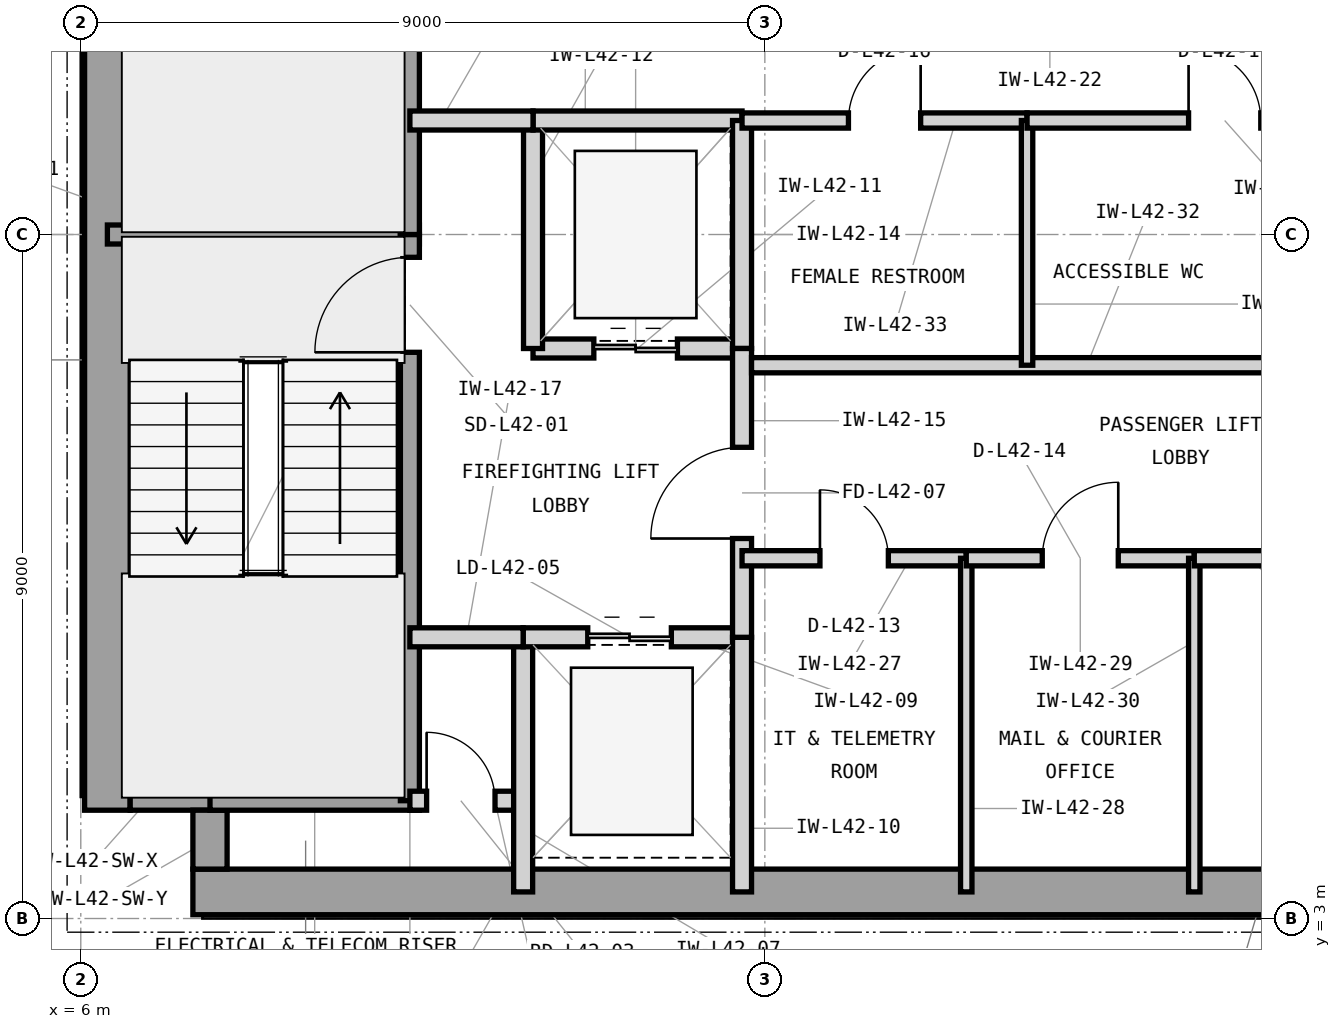
"""IFC4 building model, lengths in metres.
Left out: names, types, materials, properties, quantities, classifications, styles, units other than length and angle.
Written with IfcOpenShell. Run it as: python <this file> out.ifc"""

import sys

from ifc_helpers import new_model, si_unit, direction, frame, frame_2d, origin, place, context, subcontext, project, spatial, rectangle, extrude, element, fill, save


model = new_model("IFC4")
c1 = context("Model", 3, precision=1e-05, world=origin(), true_north=direction((0.0, 1.0)))
c2 = subcontext(c1, "Body", "Model", "MODEL_VIEW")
j1 = project(units=[si_unit("LENGTHUNIT", "METRE"), si_unit("PLANEANGLEUNIT", "RADIAN")], contexts=[c1])
p1 = place(None, origin())
s1 = spatial("IfcSite", under=j1, at=p1, CompositionType="ELEMENT")
p2 = place(p1, origin())
s2 = spatial("IfcBuilding", under=s1, at=p2, CompositionType="ELEMENT")
p3 = place(p2, frame((0.0, 0.0, 176.1)))
s3 = spatial("IfcBuildingStorey", under=s2, at=p3, CompositionType="ELEMENT", Elevation=176.1)
p4 = place(p3, frame((7.475, 3.35, 0.0), z_axis=(0.0, 0.0, 1.0), x_axis=(1.0, 0.0, 0.0)))
e1 = element("IfcWall", 1, at=p4, inside=s3, PredefinedType="SHEAR", context=c2, shape_type="SweptSolid", body=[
    extrude(rectangle(XDim=16.475, YDim=0.6, at=frame_2d((8.237, 0.0))), origin(), (0.0, 0.0, 1.0), 3.9),
])
p5 = place(p3, frame((6.35, 4.425, 0.0), z_axis=(0.0, 0.0, 1.0), x_axis=(0.0, 1.0, 0.0)))
e2 = element("IfcWall", 2, at=p5, inside=s3, PredefinedType="SHEAR", context=c2, shape_type="SweptSolid", body=[
    extrude(rectangle(XDim=15.15, YDim=0.6, at=frame_2d((7.575, 0.0))), origin(), (0.0, 0.0, 1.0), 3.9),
])
p6 = place(p3, frame((6.65, 4.65, 0.0), z_axis=(0.0, 0.0, 1.0), x_axis=(1.0, 0.0, 0.0)))
e3 = element("IfcWall", 3, at=p6, inside=s3, PredefinedType="SHEAR", context=c2, shape_type="SweptSolid", body=[
    extrude(rectangle(XDim=1.275, YDim=0.45, at=frame_2d((0.638, 0.0))), origin(), (0.0, 0.0, 1.0), 3.9),
])
p7 = place(p3, frame((7.7, 3.65, 0.0), z_axis=(0.0, 0.0, 1.0), x_axis=(0.0, 1.0, 0.0)))
e4 = element("IfcWall", 4, at=p7, inside=s3, PredefinedType="SHEAR", context=c2, shape_type="SweptSolid", body=[
    extrude(rectangle(XDim=0.775, YDim=0.45, at=frame_2d((0.388, 0.0))), origin(), (0.0, 0.0, 1.0), 3.9),
])
p8 = place(p3, frame((6.35, 12.0, 0.0), z_axis=(0.0, 0.0, 1.0), x_axis=(1.0, 0.0, 0.0)))
e5 = element("IfcWall", 5, at=p8, inside=s3, PredefinedType="SHEAR", context=c2, shape_type="SweptSolid", body=[
    extrude(rectangle(XDim=4.105, YDim=0.25, at=frame_2d((2.052, 0.0))), origin(), (0.0, 0.0, 1.0), 3.9),
])
p9 = place(p3, frame((7.7, 4.55, 0.0), z_axis=(0.0, 0.0, 1.0), x_axis=(1.0, 0.0, 0.0)))
e6 = element("IfcWall", 6, at=p9, inside=s3, PredefinedType="SHEAR", context=c2, shape_type="SweptSolid", body=[
    extrude(rectangle(XDim=2.755, YDim=0.25, at=frame_2d((1.377, 0.0))), origin(), (0.0, 0.0, 1.0), 3.9),
])
p10 = place(p3, frame((10.33, 4.55, 0.0), z_axis=(0.0, 0.0, 1.0), x_axis=(0.0, 1.0, 0.0)))
e7 = element("IfcWall", 7, at=p10, inside=s3, PredefinedType="SHEAR", context=c2, shape_type="SweptSolid", body=[
    extrude(rectangle(XDim=7.45, YDim=0.25, at=frame_2d((3.725, 0.0))), origin(), (0.0, 0.0, 1.0), 3.9),
])
p11 = place(p10, frame((5.9, 0.0, 0.0)))
e8 = element("IfcOpeningElement", 8, at=p11, cuts=e7, PredefinedType="OPENING", context=c2, shape_type="SweptSolid", body=[
    extrude(rectangle(XDim=1.25, YDim=2.2, at=frame_2d((0.625, 1.1))), frame((0.0, 0.135, 0.0), z_axis=(0.0, -1.0, 0.0), x_axis=(1.0, 0.0, 0.0)), (0.0, 0.0, 1.0), 0.27),
])
p12 = place(p3, frame((10.33, 12.0, 0.0), z_axis=(0.0, 0.0, 1.0), x_axis=(0.0, 1.0, 0.0)))
e9 = element("IfcWall", 9, at=p12, inside=s3, PredefinedType="SHEAR", context=c2, shape_type="SweptSolid", body=[
    extrude(rectangle(XDim=7.45, YDim=0.25, at=frame_2d((3.725, 0.0))), origin(), (0.0, 0.0, 1.0), 3.9),
])
p13 = place(p12, frame((5.85, 0.0, 0.0)))
e10 = element("IfcOpeningElement", 10, at=p13, cuts=e9, PredefinedType="OPENING", context=c2, shape_type="SweptSolid", body=[
    extrude(rectangle(XDim=1.25, YDim=2.2, at=frame_2d((0.625, 1.1))), frame((0.0, 0.135, 0.0), z_axis=(0.0, -1.0, 0.0), x_axis=(1.0, 0.0, 0.0)), (0.0, 0.0, 1.0), 0.27),
])
p14 = place(p3, frame((10.33, 4.55, 0.0), z_axis=(0.0, 0.0, 1.0), x_axis=(1.0, 0.0, 0.0)))
e11 = element("IfcWall", 11, at=p14, inside=s3, PredefinedType="PARTITIONING", context=c2, shape_type="SweptSolid", body=[
    extrude(rectangle(XDim=1.49, YDim=0.25, at=frame_2d((0.745, 0.0))), origin(), (0.0, 0.0, 1.0), 3.69),
])
p15 = place(p14, frame((0.22, 0.0, 0.0)))
e12 = element("IfcOpeningElement", 12, at=p15, cuts=e11, PredefinedType="OPENING", context=c2, shape_type="SweptSolid", body=[
    extrude(rectangle(XDim=0.9, YDim=2.1, at=frame_2d((0.45, 1.05))), frame((0.0, 0.135, 0.0), z_axis=(0.0, -1.0, 0.0), x_axis=(1.0, 0.0, 0.0)), (0.0, 0.0, 1.0), 0.27),
])
p16 = place(p3, frame((11.82, 3.35, 0.0), z_axis=(0.0, 0.0, 1.0), x_axis=(0.0, 1.0, 0.0)))
e13 = element("IfcWall", 13, at=p16, inside=s3, PredefinedType="PARTITIONING", context=c2, shape_type="SweptSolid", body=[
    extrude(rectangle(XDim=3.35, YDim=0.25, at=frame_2d((1.675, 0.0))), origin(), (0.0, 0.0, 1.0), 3.69),
])
p17 = place(p3, frame((11.82, 6.7, 0.0), z_axis=(0.0, 0.0, 1.0), x_axis=(1.0, 0.0, 0.0)))
e14 = element("IfcWall", 14, at=p17, inside=s3, PredefinedType="PARTITIONING", context=c2, shape_type="SweptSolid", body=[
    extrude(rectangle(XDim=2.88, YDim=0.25, at=frame_2d((1.44, 0.0))), origin(), (0.0, 0.0, 1.0), 3.283),
])
p18 = place(p17, frame((0.85, 0.0, 0.0)))
e15 = element("IfcOpeningElement", 15, at=p18, cuts=e14, PredefinedType="OPENING", context=c2, shape_type="SweptSolid", body=[
    extrude(rectangle(XDim=1.1, YDim=2.25, at=frame_2d((0.55, 1.125))), frame((0.0, 0.135, 0.0), z_axis=(0.0, -1.0, 0.0), x_axis=(1.0, 0.0, 0.0)), (0.0, 0.0, 1.0), 0.27),
])
p19 = place(p3, frame((14.7, 3.35, 0.0), z_axis=(0.0, 0.0, 1.0), x_axis=(0.0, 1.0, 0.0)))
e16 = element("IfcWall", 16, at=p19, inside=s3, PredefinedType="PARTITIONING", context=c2, shape_type="SweptSolid", body=[
    extrude(rectangle(XDim=3.35, YDim=0.25, at=frame_2d((1.675, 0.0))), origin(), (0.0, 0.0, 1.0), 3.69),
])
p20 = place(p3, frame((11.95, 10.5, 0.0), z_axis=(0.0, 0.0, 1.0), x_axis=(1.0, 0.0, 0.0)))
e17 = element("IfcWall", 17, at=p20, inside=s3, PredefinedType="PARTITIONING", context=c2, shape_type="SweptSolid", body=[
    extrude(rectangle(XDim=2.75, YDim=0.25, at=frame_2d((1.375, 0.0))), origin(), (0.0, 0.0, 1.0), 3.283),
])
p21 = place(p20, frame((0.8, 0.0, 0.0)))
e18 = element("IfcOpeningElement", 18, at=p21, cuts=e17, PredefinedType="OPENING", context=c2, shape_type="SweptSolid", body=[
    extrude(rectangle(XDim=1.1, YDim=2.25, at=frame_2d((0.55, 1.125))), frame((0.0, 0.135, 0.0), z_axis=(0.0, -1.0, 0.0), x_axis=(1.0, 0.0, 0.0)), (0.0, 0.0, 1.0), 0.27),
])
p22 = place(p3, frame((11.95, 10.5, 0.0), z_axis=(0.0, 0.0, 1.0), x_axis=(0.0, 1.0, 0.0)))
e19 = element("IfcWall", 19, at=p22, inside=s3, PredefinedType="PARTITIONING", context=c2, shape_type="SweptSolid", body=[
    extrude(rectangle(XDim=3.0, YDim=0.25, at=frame_2d((1.5, 0.0))), origin(), (0.0, 0.0, 1.0), 3.69),
])
p23 = place(p3, frame((11.95, 13.5, 0.0), z_axis=(0.0, 0.0, 1.0), x_axis=(1.0, 0.0, 0.0)))
e20 = element("IfcWall", 20, at=p23, inside=s3, PredefinedType="PARTITIONING", context=c2, shape_type="SweptSolid", body=[
    extrude(rectangle(XDim=2.75, YDim=0.25, at=frame_2d((1.375, 0.0))), origin(), (0.0, 0.0, 1.0), 3.283),
])
p24 = place(p3, frame((14.7, 10.5, 0.0), z_axis=(0.0, 0.0, 1.0), x_axis=(0.0, 1.0, 0.0)))
e21 = element("IfcWall", 21, at=p24, inside=s3, PredefinedType="PARTITIONING", context=c2, shape_type="SweptSolid", body=[
    extrude(rectangle(XDim=3.0, YDim=0.25, at=frame_2d((1.5, 0.0))), origin(), (0.0, 0.0, 1.0), 3.69),
])
p25 = place(p3, frame((14.7, 6.7, 0.0), z_axis=(0.0, 0.0, 1.0), x_axis=(0.0, 1.0, 0.0)))
e22 = element("IfcWall", 22, at=p25, inside=s3, PredefinedType="PARTITIONING", context=c2, shape_type="SweptSolid", body=[
    extrude(rectangle(XDim=3.8, YDim=0.25, at=frame_2d((1.9, 0.0))), origin(), (0.0, 0.0, 1.0), 3.69),
])
p26 = place(p25, frame((1.3, 0.0, 0.0)))
e23 = element("IfcOpeningElement", 23, at=p26, cuts=e22, PredefinedType="OPENING", context=c2, shape_type="SweptSolid", body=[
    extrude(rectangle(XDim=1.2, YDim=2.2, at=frame_2d((0.6, 1.1))), frame((0.0, 0.135, 0.0), z_axis=(0.0, -1.0, 0.0), x_axis=(1.0, 0.0, 0.0)), (0.0, 0.0, 1.0), 0.27),
])
p27 = place(p3, frame((10.33, 13.5, 0.0), z_axis=(0.0, 0.0, 1.0), x_axis=(1.0, 0.0, 0.0)))
e24 = element("IfcWall", 24, at=p27, inside=s3, PredefinedType="PARTITIONING", context=c2, shape_type="SweptSolid", body=[
    extrude(rectangle(XDim=1.62, YDim=0.25, at=frame_2d((0.81, 0.0))), origin(), (0.0, 0.0, 1.0), 3.283),
])
p28 = place(p3, frame((10.33, 6.7, 0.0), z_axis=(0.0, 0.0, 1.0), x_axis=(1.0, 0.0, 0.0)))
e25 = element("IfcWall", 25, at=p28, inside=s3, PredefinedType="PARTITIONING", context=c2, shape_type="SweptSolid", body=[
    extrude(rectangle(XDim=1.49, YDim=0.25, at=frame_2d((0.745, 0.0))), origin(), (0.0, 0.0, 1.0), 3.283),
])
p29 = place(p3, frame((14.7, 7.74, 0.0), z_axis=(0.0, 0.0, 1.0), x_axis=(1.0, 0.0, 0.0)))
e26 = element("IfcWall", 26, at=p29, inside=s3, PredefinedType="PARTITIONING", context=c2, shape_type="SweptSolid", body=[
    extrude(rectangle(XDim=2.95, YDim=0.2, at=frame_2d((1.475, 0.0))), origin(), (0.0, 0.0, 1.0), 3.69),
])
p30 = place(p29, frame((1.025, 0.0, 0.0)))
e27 = element("IfcOpeningElement", 27, at=p30, cuts=e26, PredefinedType="OPENING", context=c2, shape_type="SweptSolid", body=[
    extrude(rectangle(XDim=0.9, YDim=2.1, at=frame_2d((0.45, 1.05))), frame((0.0, 0.11, 0.0), z_axis=(0.0, -1.0, 0.0), x_axis=(1.0, 0.0, 0.0)), (0.0, 0.0, 1.0), 0.22),
])
p31 = place(p3, frame((17.65, 3.35, 0.0), z_axis=(0.0, 0.0, 1.0), x_axis=(0.0, 1.0, 0.0)))
e28 = element("IfcWall", 28, at=p31, inside=s3, PredefinedType="PARTITIONING", context=c2, shape_type="SweptSolid", body=[
    extrude(rectangle(XDim=4.39, YDim=0.15, at=frame_2d((2.195, 0.0))), origin(), (0.0, 0.0, 1.0), 3.69),
])
p32 = place(p3, frame((17.65, 7.74, 0.0), z_axis=(0.0, 0.0, 1.0), x_axis=(1.0, 0.0, 0.0)))
e29 = element("IfcWall", 29, at=p32, inside=s3, PredefinedType="PARTITIONING", context=c2, shape_type="SweptSolid", body=[
    extrude(rectangle(XDim=3.0, YDim=0.2, at=frame_2d((1.5, 0.0))), origin(), (0.0, 0.0, 1.0), 3.69),
])
p33 = place(p32, frame((1.0, 0.0, 0.0)))
e30 = element("IfcOpeningElement", 30, at=p33, cuts=e29, PredefinedType="OPENING", context=c2, shape_type="SweptSolid", body=[
    extrude(rectangle(XDim=1.0, YDim=2.15, at=frame_2d((0.5, 1.075))), frame((0.0, 0.11, 0.0), z_axis=(0.0, -1.0, 0.0), x_axis=(1.0, 0.0, 0.0)), (0.0, 0.0, 1.0), 0.22),
])
p34 = place(p3, frame((20.65, 3.35, 0.0), z_axis=(0.0, 0.0, 1.0), x_axis=(0.0, 1.0, 0.0)))
e31 = element("IfcWall", 31, at=p34, inside=s3, PredefinedType="PARTITIONING", context=c2, shape_type="SweptSolid", body=[
    extrude(rectangle(XDim=4.39, YDim=0.15, at=frame_2d((2.195, 0.0))), origin(), (0.0, 0.0, 1.0), 3.69),
])
p35 = place(p3, frame((20.65, 7.74, 0.0), z_axis=(0.0, 0.0, 1.0), x_axis=(1.0, 0.0, 0.0)))
e32 = element("IfcWall", 32, at=p35, inside=s3, PredefinedType="PARTITIONING", context=c2, shape_type="SweptSolid", body=[
    extrude(rectangle(XDim=3.0, YDim=0.2, at=frame_2d((1.5, 0.0))), origin(), (0.0, 0.0, 1.0), 3.69),
])
p36 = place(p35, frame((1.025, 0.0, 0.0)))
e33 = element("IfcOpeningElement", 33, at=p36, cuts=e32, PredefinedType="OPENING", context=c2, shape_type="SweptSolid", body=[
    extrude(rectangle(XDim=0.95, YDim=2.1, at=frame_2d((0.475, 1.05))), frame((0.0, 0.11, 0.0), z_axis=(0.0, -1.0, 0.0), x_axis=(1.0, 0.0, 0.0)), (0.0, 0.0, 1.0), 0.22),
])
p37 = place(p3, frame((14.825, 10.28, 0.0), z_axis=(0.0, 0.0, 1.0), x_axis=(1.0, 0.0, 0.0)))
e34 = element("IfcWall", 34, at=p37, inside=s3, PredefinedType="PARTITIONING", context=c2, shape_type="SweptSolid", body=[
    extrude(rectangle(XDim=8.825, YDim=0.2, at=frame_2d((4.413, 0.0))), origin(), (0.0, 0.0, 1.0), 3.69),
])
p38 = place(p3, frame((14.7, 13.5, 0.0), z_axis=(0.0, 0.0, 1.0), x_axis=(1.0, 0.0, 0.0)))
e35 = element("IfcWall", 35, at=p38, inside=s3, PredefinedType="PARTITIONING", context=c2, shape_type="SweptSolid", body=[
    extrude(rectangle(XDim=3.75, YDim=0.2, at=frame_2d((1.875, 0.0))), origin(), (0.0, 0.0, 1.0), 3.283),
])
p39 = place(p38, frame((1.4, 0.0, 0.0)))
e36 = element("IfcOpeningElement", 36, at=p39, cuts=e35, PredefinedType="OPENING", context=c2, shape_type="SweptSolid", body=[
    extrude(rectangle(XDim=0.95, YDim=2.1, at=frame_2d((0.475, 1.05))), frame((0.0, 0.11, 0.0), z_axis=(0.0, -1.0, 0.0), x_axis=(1.0, 0.0, 0.0)), (0.0, 0.0, 1.0), 0.22),
])
p40 = place(p3, frame((18.45, 10.28, 0.0), z_axis=(0.0, 0.0, 1.0), x_axis=(0.0, 1.0, 0.0)))
e37 = element("IfcWall", 37, at=p40, inside=s3, PredefinedType="PARTITIONING", context=c2, shape_type="SweptSolid", body=[
    extrude(rectangle(XDim=3.22, YDim=0.15, at=frame_2d((1.61, 0.0))), origin(), (0.0, 0.0, 1.0), 3.69),
])
p41 = place(p3, frame((18.45, 13.5, 0.0), z_axis=(0.0, 0.0, 1.0), x_axis=(1.0, 0.0, 0.0)))
e38 = element("IfcWall", 38, at=p41, inside=s3, PredefinedType="PARTITIONING", context=c2, shape_type="SweptSolid", body=[
    extrude(rectangle(XDim=5.2, YDim=0.2, at=frame_2d((2.6, 0.0))), origin(), (0.0, 0.0, 1.0), 3.283),
])
p42 = place(p41, frame((2.125, 0.0, 0.0)))
e39 = element("IfcOpeningElement", 39, at=p42, cuts=e38, PredefinedType="OPENING", context=c2, shape_type="SweptSolid", body=[
    extrude(rectangle(XDim=0.95, YDim=2.1, at=frame_2d((0.475, 1.05))), frame((0.0, 0.11, 0.0), z_axis=(0.0, -1.0, 0.0), x_axis=(1.0, 0.0, 0.0)), (0.0, 0.0, 1.0), 0.22),
])
p43 = place(p11, origin())
e40 = element("IfcDoor", 40, at=p43, inside=s3, OperationType="SINGLE_SWING_LEFT", PredefinedType="DOOR", context=c2, shape_type="SweptSolid", body=[
    extrude(rectangle(XDim=1.25, YDim=2.2, at=frame_2d((0.625, 1.1))), frame((0.0, 0.025, 0.0), z_axis=(0.0, -1.0, 0.0), x_axis=(1.0, 0.0, 0.0)), (0.0, 0.0, 1.0), 0.05),
])
fill(e8, e40)
p44 = place(p15, origin())
e41 = element("IfcDoor", 41, at=p44, inside=s3, OperationType="SINGLE_SWING_LEFT", PredefinedType="TRAPDOOR", context=c2, shape_type="SweptSolid", body=[
    extrude(rectangle(XDim=0.9, YDim=2.1, at=frame_2d((0.45, 1.05))), frame((0.0, 0.025, 0.0), z_axis=(0.0, -1.0, 0.0), x_axis=(1.0, 0.0, 0.0)), (0.0, 0.0, 1.0), 0.05),
])
fill(e12, e41)
p45 = place(p18, origin())
e42 = element("IfcDoor", 42, at=p45, inside=s3, OperationType="DOUBLE_DOOR_SLIDING", PredefinedType="DOOR", context=c2, shape_type="SweptSolid", body=[
    extrude(rectangle(XDim=1.1, YDim=2.25, at=frame_2d((0.55, 1.125))), frame((0.0, 0.025, 0.0), z_axis=(0.0, -1.0, 0.0), x_axis=(1.0, 0.0, 0.0)), (0.0, 0.0, 1.0), 0.05),
])
fill(e15, e42)
p46 = place(p21, origin())
e43 = element("IfcDoor", 43, at=p46, inside=s3, OperationType="DOUBLE_DOOR_SLIDING", PredefinedType="DOOR", context=c2, shape_type="SweptSolid", body=[
    extrude(rectangle(XDim=1.1, YDim=2.25, at=frame_2d((0.55, 1.125))), frame((0.0, 0.025, 0.0), z_axis=(0.0, -1.0, 0.0), x_axis=(1.0, 0.0, 0.0)), (0.0, 0.0, 1.0), 0.05),
])
fill(e18, e43)
p47 = place(p26, origin())
e44 = element("IfcDoor", 44, at=p47, inside=s3, OperationType="SINGLE_SWING_LEFT", PredefinedType="DOOR", context=c2, shape_type="SweptSolid", body=[
    extrude(rectangle(XDim=1.2, YDim=2.2, at=frame_2d((0.6, 1.1))), frame((0.0, 0.025, 0.0), z_axis=(0.0, -1.0, 0.0), x_axis=(1.0, 0.0, 0.0)), (0.0, 0.0, 1.0), 0.05),
])
fill(e23, e44)
p48 = place(p30, origin())
e45 = element("IfcDoor", 45, at=p48, inside=s3, OperationType="SINGLE_SWING_LEFT", PredefinedType="TRAPDOOR", context=c2, shape_type="SweptSolid", body=[
    extrude(rectangle(XDim=0.9, YDim=2.1, at=frame_2d((0.45, 1.05))), frame((0.0, 0.025, 0.0), z_axis=(0.0, -1.0, 0.0), x_axis=(1.0, 0.0, 0.0)), (0.0, 0.0, 1.0), 0.05),
])
fill(e27, e45)
p49 = place(p33, origin())
e46 = element("IfcDoor", 46, at=p49, inside=s3, OperationType="SINGLE_SWING_RIGHT", PredefinedType="DOOR", context=c2, shape_type="SweptSolid", body=[
    extrude(rectangle(XDim=1.0, YDim=2.15, at=frame_2d((0.5, 1.075))), frame((0.0, 0.025, 0.0), z_axis=(0.0, -1.0, 0.0), x_axis=(1.0, 0.0, 0.0)), (0.0, 0.0, 1.0), 0.05),
])
fill(e30, e46)
p50 = place(p39, origin())
e47 = element("IfcDoor", 47, at=p50, inside=s3, OperationType="SINGLE_SWING_RIGHT", PredefinedType="DOOR", context=c2, shape_type="SweptSolid", body=[
    extrude(rectangle(XDim=0.95, YDim=2.1, at=frame_2d((0.475, 1.05))), frame((0.0, 0.025, 0.0), z_axis=(0.0, -1.0, 0.0), x_axis=(1.0, 0.0, 0.0)), (0.0, 0.0, 1.0), 0.05),
])
fill(e36, e47)
p51 = place(p42, origin())
e48 = element("IfcDoor", 48, at=p51, inside=s3, OperationType="SINGLE_SWING_LEFT", PredefinedType="DOOR", context=c2, shape_type="SweptSolid", body=[
    extrude(rectangle(XDim=0.95, YDim=2.1, at=frame_2d((0.475, 1.05))), frame((0.0, 0.025, 0.0), z_axis=(0.0, -1.0, 0.0), x_axis=(1.0, 0.0, 0.0)), (0.0, 0.0, 1.0), 0.05),
])
fill(e39, e48)
save(model, sys.argv[1])
